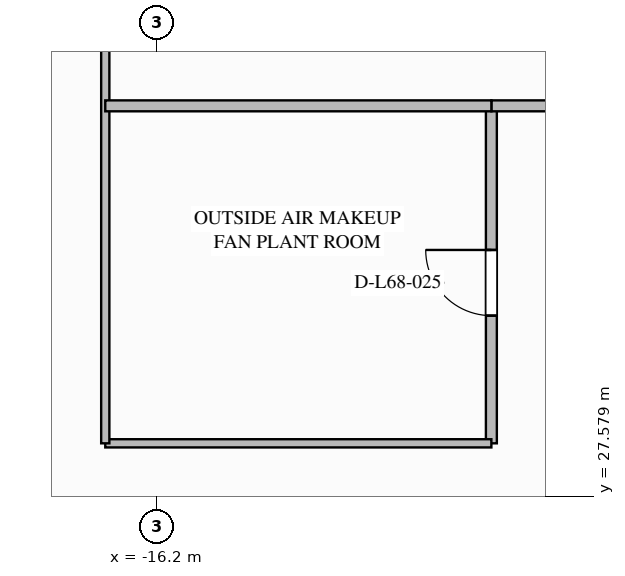
"""IFC4 building model, lengths in metres.
Left out: names, types, materials, properties, quantities, classifications, styles, units other than length and angle.
Written with IfcOpenShell. Run it as: python <this file> out.ifc"""

import sys

from ifc_helpers import new_model, si_unit, direction, frame, frame_2d, origin, place, context, subcontext, project, spatial, rectangle, extrude, element, fill, save


model = new_model("IFC4")
c1 = context("Model", 3, precision=1e-05, world=origin(), true_north=direction((0.0, 1.0)))
c2 = subcontext(c1, "Body", "Model", "MODEL_VIEW")
j1 = project(units=[si_unit("LENGTHUNIT", "METRE"), si_unit("PLANEANGLEUNIT", "RADIAN")], contexts=[c1])
p1 = place(None, origin())
s1 = spatial("IfcSite", under=j1, at=p1, CompositionType="ELEMENT")
p2 = place(p1, origin())
s2 = spatial("IfcBuilding", under=s1, at=p2, CompositionType="ELEMENT")
p3 = place(p2, frame((0.0, 0.0, 260.0)))
s3 = spatial("IfcBuildingStorey", under=s2, at=p3, CompositionType="ELEMENT", Elevation=260.0)
p4 = place(p3, frame((-10.7, 28.45, 0.0), z_axis=(0.0, 0.0, 1.0), x_axis=(0.0, 1.0, 0.0)))
e1 = element("IfcWall", 1, at=p4, inside=s3, PredefinedType="SOLIDWALL", context=c2, shape_type="SweptSolid", body=[
    extrude(rectangle(XDim=5.55, YDim=0.18, at=frame_2d((2.775, 0.0))), origin(), (0.0, 0.0, 1.0), 4.74),
])
p5 = place(p4, frame((2.1, 0.0, 0.0)))
e2 = element("IfcOpeningElement", 2, at=p5, cuts=e1, PredefinedType="OPENING", context=c2, shape_type="SweptSolid", body=[
    extrude(rectangle(XDim=1.08, YDim=2.04, at=frame_2d((0.54, 1.02))), frame((0.0, 0.1, 0.0), z_axis=(0.0, -1.0, 0.0), x_axis=(1.0, 0.0, 0.0)), (0.0, 0.0, 1.0), 0.2),
])
p6 = place(p3, frame((-10.7, 34.0, 0.0), z_axis=(0.0, 0.0, 1.0), x_axis=(1.0, 0.0, 0.0)))
e3 = element("IfcWall", 3, at=p6, inside=s3, PredefinedType="SOLIDWALL", context=c2, shape_type="SweptSolid", body=[
    extrude(rectangle(XDim=2.1, YDim=0.18, at=frame_2d((1.05, 0.0))), origin(), (0.0, 0.0, 1.0), 4.74),
])
p7 = place(p3, frame((-17.05, 28.45, 0.0), z_axis=(0.0, 0.0, 1.0), x_axis=(1.0, 0.0, 0.0)))
e4 = element("IfcWall", 4, at=p7, inside=s3, PredefinedType="PARTITIONING", context=c2, shape_type="SweptSolid", body=[
    extrude(rectangle(XDim=6.35, YDim=0.135, at=frame_2d((3.175, 0.0))), origin(), (0.0, 0.0, 1.0), 4.74),
])
p8 = place(p3, frame((-17.05, 28.45, 0.0), z_axis=(0.0, 0.0, 1.0), x_axis=(0.0, 1.0, 0.0)))
e5 = element("IfcWall", 5, at=p8, inside=s3, PredefinedType="PARTITIONING", context=c2, shape_type="SweptSolid", body=[
    extrude(rectangle(XDim=15.6, YDim=0.135, at=frame_2d((7.8, 0.0))), origin(), (0.0, 0.0, 1.0), 4.74),
])
p9 = place(p3, frame((-17.05, 34.0, 0.0), z_axis=(0.0, 0.0, 1.0), x_axis=(1.0, 0.0, 0.0)))
e6 = element("IfcWall", 6, at=p9, inside=s3, PredefinedType="SOLIDWALL", context=c2, shape_type="SweptSolid", body=[
    extrude(rectangle(XDim=6.35, YDim=0.18, at=frame_2d((3.175, 0.0))), origin(), (0.0, 0.0, 1.0), 4.74),
])
p10 = place(p5, origin())
e7 = element("IfcDoor", 7, at=p10, inside=s3, OperationType="SINGLE_SWING_RIGHT", PredefinedType="DOOR", context=c2, shape_type="SweptSolid", body=[
    extrude(rectangle(XDim=1.08, YDim=2.04, at=frame_2d((0.54, 1.02))), frame((0.0, 0.025, 0.0), z_axis=(0.0, -1.0, 0.0), x_axis=(1.0, 0.0, 0.0)), (0.0, 0.0, 1.0), 0.05),
])
fill(e2, e7)
save(model, sys.argv[1])
